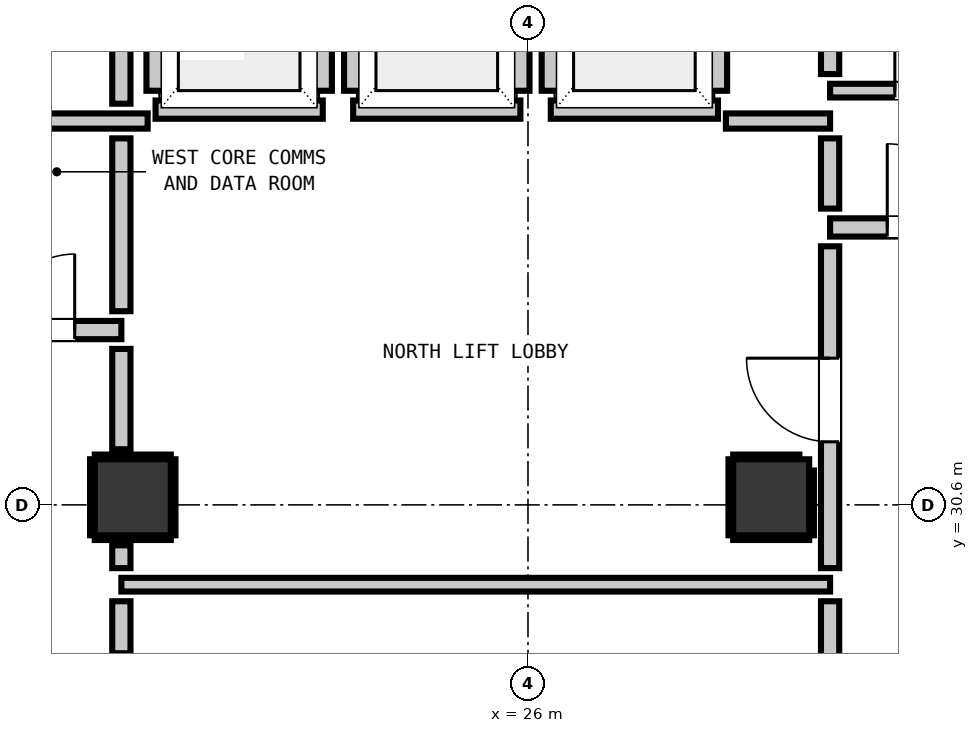
"""IFC4 building model, lengths in metres.
Left out: names, types, materials, properties, quantities, classifications, styles, units other than length and angle.
Written with IfcOpenShell. Run it as: python <this file> out.ifc"""

import sys

from ifc_helpers import new_model, si_unit, direction, frame, frame_2d, origin, origin_2d, place, context, subcontext, project, spatial, rectangle, extrude, element, fill, save


model = new_model("IFC4")
c1 = context("Model", 3, precision=1e-05, world=origin(), true_north=direction((0.0, 1.0)))
c2 = subcontext(c1, "Body", "Model", "MODEL_VIEW")
j1 = project(units=[si_unit("LENGTHUNIT", "METRE"), si_unit("PLANEANGLEUNIT", "RADIAN")], contexts=[c1])
p1 = place(None, origin())
s1 = spatial("IfcSite", under=j1, at=p1, CompositionType="ELEMENT")
p2 = place(p1, origin())
s2 = spatial("IfcBuilding", under=s1, at=p2, CompositionType="ELEMENT")
p3 = place(p2, frame((0.0, 0.0, 78.44)))
s3 = spatial("IfcBuildingStorey", under=s2, at=p3, CompositionType="ELEMENT", Elevation=78.44)
for number, where, z_axis, x_axis in (
    (1, (20.8, 30.7, 0.0), (0.0, 0.0, 1.0), (1.0, 0.0, 0.0)),
    (2, (29.2, 30.7, 0.0), (0.0, 0.0, 1.0), (1.0, 0.0, 0.0)),
):
    element("IfcColumn", number, at=place(p3, frame(where, z_axis=z_axis, x_axis=x_axis)), inside=s3, PredefinedType="COLUMN", context=c2, shape_type="SweptSolid", body=[
        extrude(rectangle(XDim=1.0, YDim=1.0, at=origin_2d()), origin(), (0.0, 0.0, 1.0), 3.32),
    ])
p4 = place(p3, frame((21.1, 35.8, 0.0), z_axis=(0.0, 0.0, 1.0), x_axis=(1.0, 0.0, 0.0)))
e3 = element("IfcWall", 3, at=p4, inside=s3, PredefinedType="PARTITIONING", context=c2, shape_type="SweptSolid", body=[
    extrude(rectangle(XDim=2.2, YDim=0.24, at=frame_2d((1.1, 0.0))), origin(), (0.0, 0.0, 1.0), 2.9),
])
p5 = place(p3, frame((21.1, 36.048, 0.0), z_axis=(0.0, 0.0, 1.0), x_axis=(0.0, 1.0, 0.0)))
e4 = element("IfcWall", 4, at=p5, inside=s3, PredefinedType="PARTITIONING", context=c2, shape_type="SweptSolid", body=[
    extrude(rectangle(XDim=2.104, YDim=0.24, at=frame_2d((1.052, 0.0))), origin(), (0.0, 0.0, 1.0), 0.905),
])
p6 = place(p3, frame((23.3, 36.048, 0.0), z_axis=(0.0, 0.0, 1.0), x_axis=(0.0, 1.0, 0.0)))
e5 = element("IfcWall", 5, at=p6, inside=s3, PredefinedType="PARTITIONING", context=c2, shape_type="SweptSolid", body=[
    extrude(rectangle(XDim=2.104, YDim=0.24, at=frame_2d((1.052, 0.0))), origin(), (0.0, 0.0, 1.0), 2.9),
])
p7 = place(p3, frame((23.7, 35.8, 0.0), z_axis=(0.0, 0.0, 1.0), x_axis=(1.0, 0.0, 0.0)))
e6 = element("IfcWall", 6, at=p7, inside=s3, PredefinedType="PARTITIONING", context=c2, shape_type="SweptSolid", body=[
    extrude(rectangle(XDim=2.2, YDim=0.24, at=frame_2d((1.1, 0.0))), origin(), (0.0, 0.0, 1.0), 2.9),
])
for number, where, z_axis, x_axis in (
    (7, (23.7, 36.048, 0.0), (0.0, 0.0, 1.0), (0.0, 1.0, 0.0)),
    (8, (25.9, 36.048, 0.0), (0.0, 0.0, 1.0), (0.0, 1.0, 0.0)),
):
    element("IfcWall", number, at=place(p3, frame(where, z_axis=z_axis, x_axis=x_axis)), inside=s3, PredefinedType="PARTITIONING", context=c2, shape_type="SweptSolid", body=[
        extrude(rectangle(XDim=2.104, YDim=0.24, at=frame_2d((1.052, 0.0))), origin(), (0.0, 0.0, 1.0), 2.9),
    ])
p8 = place(p3, frame((26.3, 35.8, 0.0), z_axis=(0.0, 0.0, 1.0), x_axis=(1.0, 0.0, 0.0)))
e9 = element("IfcWall", 9, at=p8, inside=s3, PredefinedType="PARTITIONING", context=c2, shape_type="SweptSolid", body=[
    extrude(rectangle(XDim=2.2, YDim=0.24, at=frame_2d((1.1, 0.0))), origin(), (0.0, 0.0, 1.0), 2.9),
])
p9 = place(p3, frame((26.3, 36.048, 0.0), z_axis=(0.0, 0.0, 1.0), x_axis=(0.0, 1.0, 0.0)))
e10 = element("IfcWall", 10, at=p9, inside=s3, PredefinedType="PARTITIONING", context=c2, shape_type="SweptSolid", body=[
    extrude(rectangle(XDim=2.104, YDim=0.24, at=frame_2d((1.052, 0.0))), origin(), (0.0, 0.0, 1.0), 2.9),
])
p10 = place(p3, frame((28.5, 36.048, 0.0), z_axis=(0.0, 0.0, 1.0), x_axis=(0.0, 1.0, 0.0)))
e11 = element("IfcWall", 11, at=p10, inside=s3, PredefinedType="PARTITIONING", context=c2, shape_type="SweptSolid", body=[
    extrude(rectangle(XDim=2.104, YDim=0.24, at=frame_2d((1.052, 0.0))), origin(), (0.0, 0.0, 1.0), 0.905),
])
p11 = place(p3, frame((17.45, 32.9, 0.0), z_axis=(0.0, 0.0, 1.0), x_axis=(1.0, 0.0, 0.0)))
e12 = element("IfcWall", 12, at=p11, inside=s3, PredefinedType="PARTITIONING", context=c2, shape_type="SweptSolid", body=[
    extrude(rectangle(XDim=3.2, YDim=0.24, at=frame_2d((1.6, 0.0))), origin(), (0.0, 0.0, 1.0), 2.9),
])
p12 = place(p11, frame((0.159, 0.0, 0.0)))
e13 = element("IfcOpeningElement", 13, at=p12, cuts=e12, PredefinedType="OPENING", context=c2, shape_type="SweptSolid", body=[
    extrude(rectangle(XDim=1.1, YDim=2.15, at=frame_2d((0.55, 1.075))), frame((0.0, 0.13, 0.0), z_axis=(0.0, -1.0, 0.0), x_axis=(1.0, 0.0, 0.0)), (0.0, 0.0, 1.0), 0.26),
])
p13 = place(p11, frame((1.586, 0.0, 0.0)))
e14 = element("IfcOpeningElement", 14, at=p13, cuts=e12, PredefinedType="OPENING", context=c2, shape_type="SweptSolid", body=[
    extrude(rectangle(XDim=1.0, YDim=2.15, at=frame_2d((0.5, 1.075))), frame((0.0, 0.13, 0.0), z_axis=(0.0, -1.0, 0.0), x_axis=(1.0, 0.0, 0.0)), (0.0, 0.0, 1.0), 0.26),
])
p14 = place(p3, frame((29.975, 34.25, 0.0), z_axis=(0.0, 0.0, 1.0), x_axis=(1.0, 0.0, 0.0)))
e15 = element("IfcWall", 15, at=p14, inside=s3, PredefinedType="PARTITIONING", context=c2, shape_type="SweptSolid", body=[
    extrude(rectangle(XDim=2.475, YDim=0.24, at=frame_2d((1.237, 0.0))), origin(), (0.0, 0.0, 1.0), 2.9),
])
p15 = place(p14, frame((0.752, 0.0, 0.0)))
e16 = element("IfcOpeningElement", 16, at=p15, cuts=e15, PredefinedType="OPENING", context=c2, shape_type="SweptSolid", body=[
    extrude(rectangle(XDim=1.1, YDim=2.15, at=frame_2d((0.55, 1.075))), frame((0.0, 0.13, 0.0), z_axis=(0.0, -1.0, 0.0), x_axis=(1.0, 0.0, 0.0)), (0.0, 0.0, 1.0), 0.26),
])
p16 = place(p3, frame((18.95, 35.65, 0.0), z_axis=(0.0, 0.0, 1.0), x_axis=(1.0, 0.0, 0.0)))
e17 = element("IfcWall", 17, at=p16, inside=s3, PredefinedType="PARTITIONING", context=c2, shape_type="SweptSolid", body=[
    extrude(rectangle(XDim=2.046, YDim=0.2, at=frame_2d((1.023, 0.0))), origin(), (0.0, 0.0, 1.0), 2.9),
])
p17 = place(p3, frame((28.604, 35.65, 0.0), z_axis=(0.0, 0.0, 1.0), x_axis=(1.0, 0.0, 0.0)))
e18 = element("IfcWall", 18, at=p17, inside=s3, PredefinedType="PARTITIONING", context=c2, shape_type="SweptSolid", body=[
    extrude(rectangle(XDim=1.371, YDim=0.2, at=frame_2d((0.686, 0.0))), origin(), (0.0, 0.0, 1.0), 2.9),
])
p18 = place(p3, frame((20.65, 29.55, 0.0), z_axis=(0.0, 0.0, 1.0), x_axis=(1.0, 0.0, 0.0)))
e19 = element("IfcWall", 19, at=p18, inside=s3, PredefinedType="PARTITIONING", context=c2, shape_type="SweptSolid", body=[
    extrude(rectangle(XDim=9.325, YDim=0.18, at=frame_2d((4.663, 0.0))), origin(), (0.0, 0.0, 1.0), 2.9),
])
p19 = place(p3, frame((29.975, 36.05, 0.0), z_axis=(0.0, 0.0, 1.0), x_axis=(1.0, 0.0, 0.0)))
e20 = element("IfcWall", 20, at=p19, inside=s3, PredefinedType="PARTITIONING", context=c2, shape_type="SweptSolid", body=[
    extrude(rectangle(XDim=2.505, YDim=0.18, at=frame_2d((1.252, 0.0))), origin(), (0.0, 0.0, 1.0), 2.9),
])
p20 = place(p19, frame((0.852, 0.0, 0.0)))
e21 = element("IfcOpeningElement", 21, at=p20, cuts=e20, PredefinedType="OPENING", context=c2, shape_type="SweptSolid", body=[
    extrude(rectangle(XDim=0.9, YDim=2.1, at=frame_2d((0.45, 1.05))), frame((0.0, 0.1, 0.0), z_axis=(0.0, -1.0, 0.0), x_axis=(1.0, 0.0, 0.0)), (0.0, 0.0, 1.0), 0.2),
])
p21 = place(p3, frame((20.65, 28.648, 0.0), z_axis=(0.0, 0.0, 1.0), x_axis=(0.0, 1.0, 0.0)))
e22 = element("IfcWall", 22, at=p21, inside=s3, PredefinedType="PARTITIONING", context=c2, shape_type="SweptSolid", body=[
    extrude(rectangle(XDim=0.684, YDim=0.24, at=frame_2d((0.342, 0.0))), origin(), (0.0, 0.0, 1.0), 0.905),
])
p22 = place(p3, frame((20.65, 29.768, 0.0), z_axis=(0.0, 0.0, 1.0), x_axis=(0.0, 1.0, 0.0)))
e23 = element("IfcWall", 23, at=p22, inside=s3, PredefinedType="PARTITIONING", context=c2, shape_type="SweptSolid", body=[
    extrude(rectangle(XDim=0.3, YDim=0.24, at=frame_2d((0.15, 0.0))), origin(), (0.0, 0.0, 1.0), 0.905),
])
p23 = place(p3, frame((20.65, 31.332, 0.0), z_axis=(0.0, 0.0, 1.0), x_axis=(0.0, 1.0, 0.0)))
e24 = element("IfcWall", 24, at=p23, inside=s3, PredefinedType="PARTITIONING", context=c2, shape_type="SweptSolid", body=[
    extrude(rectangle(XDim=1.32, YDim=0.24, at=frame_2d((0.66, 0.0))), origin(), (0.0, 0.0, 1.0), 0.905),
])
p24 = place(p3, frame((20.65, 33.148, 0.0), z_axis=(0.0, 0.0, 1.0), x_axis=(0.0, 1.0, 0.0)))
e25 = element("IfcWall", 25, at=p24, inside=s3, PredefinedType="PARTITIONING", context=c2, shape_type="SweptSolid", body=[
    extrude(rectangle(XDim=2.274, YDim=0.24, at=frame_2d((1.137, 0.0))), origin(), (0.0, 0.0, 1.0), 0.905),
])
p25 = place(p3, frame((20.65, 35.878, 0.0), z_axis=(0.0, 0.0, 1.0), x_axis=(0.0, 1.0, 0.0)))
e26 = element("IfcWall", 26, at=p25, inside=s3, PredefinedType="PARTITIONING", context=c2, shape_type="SweptSolid", body=[
    extrude(rectangle(XDim=2.674, YDim=0.24, at=frame_2d((1.337, 0.0))), origin(), (0.0, 0.0, 1.0), 0.905),
])
p26 = place(p3, frame((29.975, 25.648, 0.0), z_axis=(0.0, 0.0, 1.0), x_axis=(0.0, 1.0, 0.0)))
e27 = element("IfcWall", 27, at=p26, inside=s3, PredefinedType="PARTITIONING", context=c2, shape_type="SweptSolid", body=[
    extrude(rectangle(XDim=3.684, YDim=0.24, at=frame_2d((1.842, 0.0))), origin(), (0.0, 0.0, 1.0), 2.9),
])
p27 = place(p3, frame((29.975, 29.768, 0.0), z_axis=(0.0, 0.0, 1.0), x_axis=(0.0, 1.0, 0.0)))
e28 = element("IfcWall", 28, at=p27, inside=s3, PredefinedType="PARTITIONING", context=c2, shape_type="SweptSolid", body=[
    extrude(rectangle(XDim=4.234, YDim=0.24, at=frame_2d((2.117, 0.0))), origin(), (0.0, 0.0, 1.0), 2.9),
])
p28 = place(p27, frame((1.662, 0.0, 0.0)))
e29 = element("IfcOpeningElement", 29, at=p28, cuts=e28, PredefinedType="OPENING", context=c2, shape_type="SweptSolid", body=[
    extrude(rectangle(XDim=1.1, YDim=2.15, at=frame_2d((0.55, 1.075))), frame((0.0, 0.13, 0.0), z_axis=(0.0, -1.0, 0.0), x_axis=(1.0, 0.0, 0.0)), (0.0, 0.0, 1.0), 0.26),
])
p29 = place(p3, frame((29.975, 34.498, 0.0), z_axis=(0.0, 0.0, 1.0), x_axis=(0.0, 1.0, 0.0)))
e30 = element("IfcWall", 30, at=p29, inside=s3, PredefinedType="PARTITIONING", context=c2, shape_type="SweptSolid", body=[
    extrude(rectangle(XDim=0.924, YDim=0.24, at=frame_2d((0.462, 0.0))), origin(), (0.0, 0.0, 1.0), 2.9),
])
p30 = place(p3, frame((29.975, 36.268, 0.0), z_axis=(0.0, 0.0, 1.0), x_axis=(0.0, 1.0, 0.0)))
e31 = element("IfcWall", 31, at=p30, inside=s3, PredefinedType="PARTITIONING", context=c2, shape_type="SweptSolid", body=[
    extrude(rectangle(XDim=2.284, YDim=0.24, at=frame_2d((1.142, 0.0))), origin(), (0.0, 0.0, 1.0), 2.9),
])
for number, where, z_axis, x_axis in (
    (32, (20.3, 30.168, 0.0), (0.0, 0.0, 1.0), (1.0, 0.0, 0.0)),
    (33, (20.3, 31.232, 0.0), (0.0, 0.0, 1.0), (1.0, 0.0, 0.0)),
    (34, (20.268, 30.2, 0.0), (0.0, 0.0, 1.0), (0.0, 1.0, 0.0)),
    (35, (21.332, 30.2, 0.0), (0.0, 0.0, 1.0), (0.0, 1.0, 0.0)),
    (36, (28.7, 30.168, 0.0), (0.0, 0.0, 1.0), (1.0, 0.0, 0.0)),
):
    element("IfcWall", number, at=place(p3, frame(where, z_axis=z_axis, x_axis=x_axis)), inside=s3, PredefinedType="PARTITIONING", context=c2, shape_type="SweptSolid", body=[
        extrude(rectangle(XDim=1.0, YDim=0.06, at=frame_2d((0.5, 0.0))), origin(), (0.0, 0.0, 1.0), 0.905),
    ])
p31 = place(p3, frame((28.7, 31.232, 0.0), z_axis=(0.0, 0.0, 1.0), x_axis=(1.0, 0.0, 0.0)))
e37 = element("IfcWall", 37, at=p31, inside=s3, PredefinedType="PARTITIONING", context=c2, shape_type="SweptSolid", body=[
    extrude(rectangle(XDim=0.871, YDim=0.06, at=frame_2d((0.436, 0.0))), origin(), (0.0, 0.0, 1.0), 0.905),
])
p32 = place(p3, frame((28.668, 30.2, 0.0), z_axis=(0.0, 0.0, 1.0), x_axis=(0.0, 1.0, 0.0)))
e38 = element("IfcWall", 38, at=p32, inside=s3, PredefinedType="PARTITIONING", context=c2, shape_type="SweptSolid", body=[
    extrude(rectangle(XDim=1.0, YDim=0.06, at=frame_2d((0.5, 0.0))), origin(), (0.0, 0.0, 1.0), 0.905),
])
p33 = place(p3, frame((29.732, 30.2, 0.0), z_axis=(0.0, 0.0, 1.0), x_axis=(0.0, 1.0, 0.0)))
e39 = element("IfcWall", 39, at=p33, inside=s3, PredefinedType="PARTITIONING", context=c2, shape_type="SweptSolid", body=[
    extrude(rectangle(XDim=0.852, YDim=0.06, at=frame_2d((0.426, 0.0))), origin(), (0.0, 0.0, 1.0), 0.905),
])
p34 = place(p28, origin())
e40 = element("IfcDoor", 40, at=p34, inside=s3, OperationType="SINGLE_SWING_RIGHT", PredefinedType="DOOR", context=c2, shape_type="SweptSolid", body=[
    extrude(rectangle(XDim=1.1, YDim=2.15, at=frame_2d((0.55, 1.075))), frame((0.0, 0.025, 0.0), z_axis=(0.0, -1.0, 0.0), x_axis=(1.0, 0.0, 0.0)), (0.0, 0.0, 1.0), 0.05),
])
fill(e29, e40)
p35 = place(p15, origin())
e41 = element("IfcDoor", 41, at=p35, inside=s3, OperationType="SINGLE_SWING_LEFT", PredefinedType="DOOR", context=c2, shape_type="SweptSolid", body=[
    extrude(rectangle(XDim=1.1, YDim=2.15, at=frame_2d((0.55, 1.075))), frame((0.0, 0.025, 0.0), z_axis=(0.0, -1.0, 0.0), x_axis=(1.0, 0.0, 0.0)), (0.0, 0.0, 1.0), 0.05),
])
fill(e16, e41)
p36 = place(p13, origin())
e42 = element("IfcDoor", 42, at=p36, inside=s3, OperationType="SINGLE_SWING_RIGHT", PredefinedType="DOOR", context=c2, shape_type="SweptSolid", body=[
    extrude(rectangle(XDim=1.0, YDim=2.15, at=frame_2d((0.5, 1.075))), frame((0.0, 0.025, 0.0), z_axis=(0.0, -1.0, 0.0), x_axis=(1.0, 0.0, 0.0)), (0.0, 0.0, 1.0), 0.05),
])
fill(e14, e42)
p37 = place(p20, origin())
e43 = element("IfcDoor", 43, at=p37, inside=s3, OperationType="SINGLE_SWING_LEFT", PredefinedType="DOOR", context=c2, shape_type="SweptSolid", body=[
    extrude(rectangle(XDim=0.9, YDim=2.1, at=frame_2d((0.45, 1.05))), frame((0.0, 0.025, 0.0), z_axis=(0.0, -1.0, 0.0), x_axis=(1.0, 0.0, 0.0)), (0.0, 0.0, 1.0), 0.05),
])
fill(e21, e43)
save(model, sys.argv[1])
